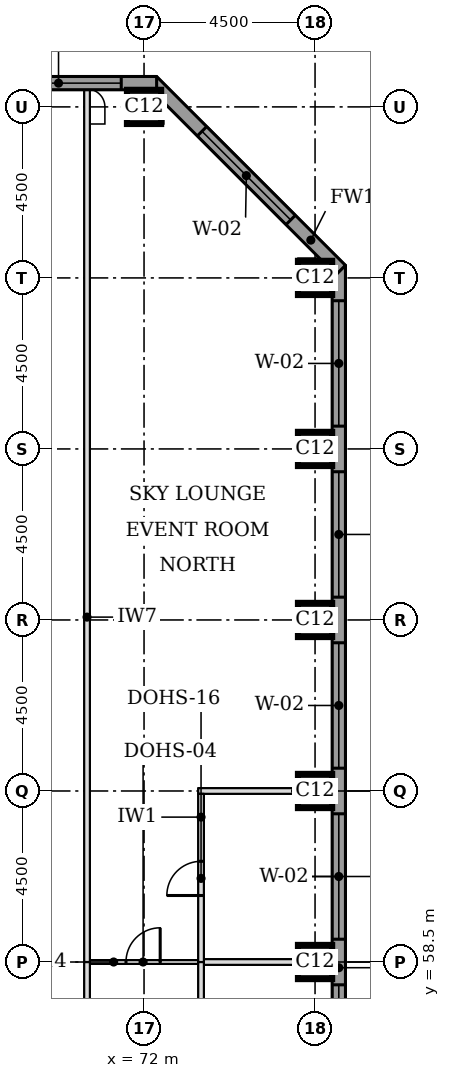
"""IFC4 building model, lengths in metres.
Left out: names, types, materials, properties, quantities, classifications, styles, units other than length and angle.
Written with IfcOpenShell. Run it as: python <this file> out.ifc"""

import sys

from ifc_helpers import new_model, si_unit, direction, frame, frame_2d, origin, origin_2d, place, context, subcontext, project, spatial, rectangle, extrude, element, fill, save


model = new_model("IFC4")
c1 = context("Model", 3, precision=1e-05, world=origin(), true_north=direction((0.0, 1.0)))
c2 = subcontext(c1, "Body", "Model", "MODEL_VIEW")
j1 = project(units=[si_unit("LENGTHUNIT", "METRE"), si_unit("PLANEANGLEUNIT", "RADIAN")], contexts=[c1])
p1 = place(None, origin())
s1 = spatial("IfcSite", under=j1, at=p1, CompositionType="ELEMENT")
p2 = place(p1, origin())
s2 = spatial("IfcBuilding", under=s1, at=p2, CompositionType="ELEMENT")
p3 = place(p2, frame((0.0, 0.0, 260.0)))
s3 = spatial("IfcBuildingStorey", under=s2, at=p3, CompositionType="ELEMENT", Elevation=260.0)
for number, where, z_axis, x_axis in (
    (1, (76.5, 58.5, 0.0), (0.0, 0.0, 1.0), (1.0, 0.0, 0.0)),
    (2, (76.5, 63.0, 0.0), (0.0, 0.0, 1.0), (1.0, 0.0, 0.0)),
    (3, (76.5, 67.5, 0.0), (0.0, 0.0, 1.0), (1.0, 0.0, 0.0)),
    (4, (76.5, 72.0, 0.0), (0.0, 0.0, 1.0), (1.0, 0.0, 0.0)),
    (5, (76.5, 76.5, 0.0), (0.0, 0.0, 1.0), (1.0, 0.0, 0.0)),
    (6, (72.0, 81.0, 0.0), (0.0, 0.0, 1.0), (1.0, 0.0, 0.0)),
):
    element("IfcColumn", number, at=place(p3, frame(where, z_axis=z_axis, x_axis=x_axis)), inside=s3, PredefinedType="COLUMN", context=c2, shape_type="SweptSolid", body=[
        extrude(rectangle(XDim=0.9, YDim=0.9, at=origin_2d()), origin(), (0.0, 0.0, 1.0), 3.7),
    ])
p4 = place(p3, frame((77.125, 44.669, 0.0), z_axis=(0.0, 0.0, 1.0), x_axis=(0.0, 1.0, 0.0)))
e7 = element("IfcWall", 7, at=p4, inside=s3, PredefinedType="STANDARD", context=c2, shape_type="SweptSolid", body=[
    extrude(rectangle(XDim=32.163, YDim=0.35, at=frame_2d((16.081, 0.0))), origin(), (0.0, 0.0, 1.0), 3.425),
])
p5 = place(p4, frame((0.931, 0.0, 0.9)))
e8 = element("IfcOpeningElement", 8, at=p5, cuts=e7, PredefinedType="OPENING", context=c2, shape_type="SweptSolid", body=[
    extrude(rectangle(XDim=3.3, YDim=1.9, at=frame_2d((1.65, 0.95))), frame((0.0, 0.185, 0.0), z_axis=(0.0, -1.0, 0.0), x_axis=(1.0, 0.0, 0.0)), (0.0, 0.0, 1.0), 0.37),
])
p6 = place(p4, frame((5.431, 0.0, 0.9)))
e9 = element("IfcOpeningElement", 9, at=p6, cuts=e7, PredefinedType="OPENING", context=c2, shape_type="SweptSolid", body=[
    extrude(rectangle(XDim=3.3, YDim=1.9, at=frame_2d((1.65, 0.95))), frame((0.0, 0.185, 0.0), z_axis=(0.0, -1.0, 0.0), x_axis=(1.0, 0.0, 0.0)), (0.0, 0.0, 1.0), 0.37),
])
p7 = place(p4, frame((9.931, 0.0, 0.9)))
e10 = element("IfcOpeningElement", 10, at=p7, cuts=e7, PredefinedType="OPENING", context=c2, shape_type="SweptSolid", body=[
    extrude(rectangle(XDim=3.3, YDim=1.9, at=frame_2d((1.65, 0.95))), frame((0.0, 0.185, 0.0), z_axis=(0.0, -1.0, 0.0), x_axis=(1.0, 0.0, 0.0)), (0.0, 0.0, 1.0), 0.37),
])
p8 = place(p4, frame((14.431, 0.0, 0.9)))
e11 = element("IfcOpeningElement", 11, at=p8, cuts=e7, PredefinedType="OPENING", context=c2, shape_type="SweptSolid", body=[
    extrude(rectangle(XDim=3.3, YDim=1.9, at=frame_2d((1.65, 0.95))), frame((0.0, 0.185, 0.0), z_axis=(0.0, -1.0, 0.0), x_axis=(1.0, 0.0, 0.0)), (0.0, 0.0, 1.0), 0.37),
])
p9 = place(p4, frame((18.931, 0.0, 0.9)))
e12 = element("IfcOpeningElement", 12, at=p9, cuts=e7, PredefinedType="OPENING", context=c2, shape_type="SweptSolid", body=[
    extrude(rectangle(XDim=3.3, YDim=1.9, at=frame_2d((1.65, 0.95))), frame((0.0, 0.185, 0.0), z_axis=(0.0, -1.0, 0.0), x_axis=(1.0, 0.0, 0.0)), (0.0, 0.0, 1.0), 0.37),
])
p10 = place(p4, frame((23.431, 0.0, 0.9)))
e13 = element("IfcOpeningElement", 13, at=p10, cuts=e7, PredefinedType="OPENING", context=c2, shape_type="SweptSolid", body=[
    extrude(rectangle(XDim=3.3, YDim=1.9, at=frame_2d((1.65, 0.95))), frame((0.0, 0.185, 0.0), z_axis=(0.0, -1.0, 0.0), x_axis=(1.0, 0.0, 0.0)), (0.0, 0.0, 1.0), 0.37),
])
p11 = place(p4, frame((27.931, 0.0, 0.9)))
e14 = element("IfcOpeningElement", 14, at=p11, cuts=e7, PredefinedType="OPENING", context=c2, shape_type="SweptSolid", body=[
    extrude(rectangle(XDim=3.3, YDim=1.9, at=frame_2d((1.65, 0.95))), frame((0.0, 0.185, 0.0), z_axis=(0.0, -1.0, 0.0), x_axis=(1.0, 0.0, 0.0)), (0.0, 0.0, 1.0), 0.37),
])
p12 = place(p3, frame((77.176, 76.708, 0.0), z_axis=(0.0, 0.0, 1.0), x_axis=(-0.707106781187, 0.707106781187, 0.0)))
e15 = element("IfcWall", 15, at=p12, inside=s3, PredefinedType="STANDARD", context=c2, shape_type="SweptSolid", body=[
    extrude(rectangle(XDim=7.027, YDim=0.35, at=frame_2d((3.513, 0.0))), origin(), (0.0, 0.0, 1.0), 3.425),
])
p13 = place(p12, frame((1.863, 0.0, 0.9)))
e16 = element("IfcOpeningElement", 16, at=p13, cuts=e15, PredefinedType="OPENING", context=c2, shape_type="SweptSolid", body=[
    extrude(rectangle(XDim=3.3, YDim=1.9, at=frame_2d((1.65, 0.95))), frame((0.0, 0.185, 0.0), z_axis=(0.0, -1.0, 0.0), x_axis=(1.0, 0.0, 0.0)), (0.0, 0.0, 1.0), 0.37),
])
p14 = place(p3, frame((72.331, 81.625, 0.0), z_axis=(0.0, 0.0, 1.0), x_axis=(-1.0, 0.0, 0.0)))
e17 = element("IfcWall", 17, at=p14, inside=s3, PredefinedType="STANDARD", context=c2, shape_type="SweptSolid", body=[
    extrude(rectangle(XDim=32.163, YDim=0.35, at=frame_2d((16.081, 0.0))), origin(), (0.0, 0.0, 1.0), 3.425),
])
p15 = place(p14, frame((0.931, 0.0, 0.9)))
e18 = element("IfcOpeningElement", 18, at=p15, cuts=e17, PredefinedType="OPENING", context=c2, shape_type="SweptSolid", body=[
    extrude(rectangle(XDim=3.3, YDim=1.9, at=frame_2d((1.65, 0.95))), frame((0.0, 0.185, 0.0), z_axis=(0.0, -1.0, 0.0), x_axis=(1.0, 0.0, 0.0)), (0.0, 0.0, 1.0), 0.37),
])
p16 = place(p14, frame((5.431, 0.0, 0.9)))
e19 = element("IfcOpeningElement", 19, at=p16, cuts=e17, PredefinedType="OPENING", context=c2, shape_type="SweptSolid", body=[
    extrude(rectangle(XDim=3.3, YDim=1.9, at=frame_2d((1.65, 0.95))), frame((0.0, 0.185, 0.0), z_axis=(0.0, -1.0, 0.0), x_axis=(1.0, 0.0, 0.0)), (0.0, 0.0, 1.0), 0.37),
])
p17 = place(p14, frame((9.931, 0.0, 0.9)))
e20 = element("IfcOpeningElement", 20, at=p17, cuts=e17, PredefinedType="OPENING", context=c2, shape_type="SweptSolid", body=[
    extrude(rectangle(XDim=3.3, YDim=1.9, at=frame_2d((1.65, 0.95))), frame((0.0, 0.185, 0.0), z_axis=(0.0, -1.0, 0.0), x_axis=(1.0, 0.0, 0.0)), (0.0, 0.0, 1.0), 0.37),
])
p18 = place(p14, frame((14.431, 0.0, 0.9)))
e21 = element("IfcOpeningElement", 21, at=p18, cuts=e17, PredefinedType="OPENING", context=c2, shape_type="SweptSolid", body=[
    extrude(rectangle(XDim=3.3, YDim=1.9, at=frame_2d((1.65, 0.95))), frame((0.0, 0.185, 0.0), z_axis=(0.0, -1.0, 0.0), x_axis=(1.0, 0.0, 0.0)), (0.0, 0.0, 1.0), 0.37),
])
p19 = place(p14, frame((18.931, 0.0, 0.9)))
e22 = element("IfcOpeningElement", 22, at=p19, cuts=e17, PredefinedType="OPENING", context=c2, shape_type="SweptSolid", body=[
    extrude(rectangle(XDim=3.3, YDim=1.9, at=frame_2d((1.65, 0.95))), frame((0.0, 0.185, 0.0), z_axis=(0.0, -1.0, 0.0), x_axis=(1.0, 0.0, 0.0)), (0.0, 0.0, 1.0), 0.37),
])
p20 = place(p14, frame((23.431, 0.0, 0.9)))
e23 = element("IfcOpeningElement", 23, at=p20, cuts=e17, PredefinedType="OPENING", context=c2, shape_type="SweptSolid", body=[
    extrude(rectangle(XDim=3.3, YDim=1.9, at=frame_2d((1.65, 0.95))), frame((0.0, 0.185, 0.0), z_axis=(0.0, -1.0, 0.0), x_axis=(1.0, 0.0, 0.0)), (0.0, 0.0, 1.0), 0.37),
])
p21 = place(p14, frame((27.931, 0.0, 0.9)))
e24 = element("IfcOpeningElement", 24, at=p21, cuts=e17, PredefinedType="OPENING", context=c2, shape_type="SweptSolid", body=[
    extrude(rectangle(XDim=3.3, YDim=1.9, at=frame_2d((1.65, 0.95))), frame((0.0, 0.185, 0.0), z_axis=(0.0, -1.0, 0.0), x_axis=(1.0, 0.0, 0.0)), (0.0, 0.0, 1.0), 0.37),
])
p22 = place(p3, frame((70.575, 58.5, 0.0), z_axis=(0.0, 0.0, 1.0), x_axis=(1.0, 0.0, 0.0)))
e25 = element("IfcWall", 25, at=p22, inside=s3, PredefinedType="PARTITIONING", context=c2, shape_type="SweptSolid", body=[
    extrude(rectangle(XDim=2.85, YDim=0.1, at=frame_2d((1.425, 0.0))), origin(), (0.0, 0.0, 1.0), 3.45),
])
p23 = place(p22, frame((0.95, 0.0, 0.0)))
e26 = element("IfcOpeningElement", 26, at=p23, cuts=e25, PredefinedType="OPENING", context=c2, shape_type="SweptSolid", body=[
    extrude(rectangle(XDim=0.9, YDim=2.1, at=frame_2d((0.45, 1.05))), frame((0.0, 0.06, 0.0), z_axis=(0.0, -1.0, 0.0), x_axis=(1.0, 0.0, 0.0)), (0.0, 0.0, 1.0), 0.12),
])
p24 = place(p3, frame((73.575, 58.5, 0.0), z_axis=(0.0, 0.0, 1.0), x_axis=(1.0, 0.0, 0.0)))
e27 = element("IfcWall", 27, at=p24, inside=s3, PredefinedType="PARTITIONING", context=c2, shape_type="SweptSolid", body=[
    extrude(rectangle(XDim=3.375, YDim=0.15, at=frame_2d((1.688, 0.0))), origin(), (0.0, 0.0, 1.0), 3.45),
])
p25 = place(p3, frame((73.425, 63.0, 0.0), z_axis=(0.0, 0.0, 1.0), x_axis=(1.0, 0.0, 0.0)))
e28 = element("IfcWall", 28, at=p25, inside=s3, PredefinedType="PARTITIONING", context=c2, shape_type="SweptSolid", body=[
    extrude(rectangle(XDim=3.525, YDim=0.15, at=frame_2d((1.762, 0.0))), origin(), (0.0, 0.0, 1.0), 3.45),
])
p26 = place(p3, frame((70.5, 54.0, 0.0), z_axis=(0.0, 0.0, 1.0), x_axis=(0.0, 1.0, 0.0)))
e29 = element("IfcWall", 29, at=p26, inside=s3, PredefinedType="PARTITIONING", context=c2, shape_type="SweptSolid", body=[
    extrude(rectangle(XDim=4.5, YDim=0.15, at=frame_2d((2.25, 0.0))), origin(), (0.0, 0.0, 1.0), 3.45),
])
p27 = place(p26, frame((1.75, 0.0, 0.0)))
e30 = element("IfcOpeningElement", 30, at=p27, cuts=e29, PredefinedType="OPENING", context=c2, shape_type="SweptSolid", body=[
    extrude(rectangle(XDim=1.0, YDim=2.1, at=frame_2d((0.5, 1.05))), frame((0.0, 0.085, 0.0), z_axis=(0.0, -1.0, 0.0), x_axis=(1.0, 0.0, 0.0)), (0.0, 0.0, 1.0), 0.17),
])
p28 = place(p3, frame((73.5, 54.1, 0.0), z_axis=(0.0, 0.0, 1.0), x_axis=(0.0, 1.0, 0.0)))
e31 = element("IfcWall", 31, at=p28, inside=s3, PredefinedType="PARTITIONING", context=c2, shape_type="SweptSolid", body=[
    extrude(rectangle(XDim=4.4, YDim=0.15, at=frame_2d((2.2, 0.0))), origin(), (0.0, 0.0, 1.0), 3.45),
])
p29 = place(p28, frame((1.75, 0.0, 0.0)))
e32 = element("IfcOpeningElement", 32, at=p29, cuts=e31, PredefinedType="OPENING", context=c2, shape_type="SweptSolid", body=[
    extrude(rectangle(XDim=0.9, YDim=2.1, at=frame_2d((0.45, 1.05))), frame((0.0, 0.085, 0.0), z_axis=(0.0, -1.0, 0.0), x_axis=(1.0, 0.0, 0.0)), (0.0, 0.0, 1.0), 0.17),
])
p30 = place(p3, frame((70.5, 58.5, 0.0), z_axis=(0.0, 0.0, 1.0), x_axis=(0.0, 1.0, 0.0)))
e33 = element("IfcWall", 33, at=p30, inside=s3, PredefinedType="PARTITIONING", context=c2, shape_type="SweptSolid", body=[
    extrude(rectangle(XDim=22.95, YDim=0.15, at=frame_2d((11.475, 0.0))), origin(), (0.0, 0.0, 1.0), 3.45),
])
p31 = place(p3, frame((73.5, 58.5, 0.0), z_axis=(0.0, 0.0, 1.0), x_axis=(0.0, 1.0, 0.0)))
e34 = element("IfcWall", 34, at=p31, inside=s3, PredefinedType="PARTITIONING", context=c2, shape_type="SweptSolid", body=[
    extrude(rectangle(XDim=4.425, YDim=0.15, at=frame_2d((2.212, 0.0))), origin(), (0.0, 0.0, 1.0), 3.45),
])
p32 = place(p31, frame((1.75, 0.0, 0.0)))
e35 = element("IfcOpeningElement", 35, at=p32, cuts=e34, PredefinedType="OPENING", context=c2, shape_type="SweptSolid", body=[
    extrude(rectangle(XDim=0.9, YDim=2.1, at=frame_2d((0.45, 1.05))), frame((0.0, 0.085, 0.0), z_axis=(0.0, -1.0, 0.0), x_axis=(1.0, 0.0, 0.0)), (0.0, 0.0, 1.0), 0.17),
])
p33 = place(p7, origin())
e36 = element("IfcWindow", 36, at=p33, inside=s3, PartitioningType="SINGLE_PANEL", PredefinedType="WINDOW", context=c2, shape_type="SweptSolid", body=[
    extrude(rectangle(XDim=3.3, YDim=1.9, at=frame_2d((1.65, 0.95))), frame((0.0, 0.085, 0.0), z_axis=(0.0, -1.0, 0.0), x_axis=(1.0, 0.0, 0.0)), (0.0, 0.0, 1.0), 0.06),
])
fill(e10, e36)
p34 = place(p8, origin())
e37 = element("IfcWindow", 37, at=p34, inside=s3, PartitioningType="SINGLE_PANEL", PredefinedType="WINDOW", context=c2, shape_type="SweptSolid", body=[
    extrude(rectangle(XDim=3.3, YDim=1.9, at=frame_2d((1.65, 0.95))), frame((0.0, 0.085, 0.0), z_axis=(0.0, -1.0, 0.0), x_axis=(1.0, 0.0, 0.0)), (0.0, 0.0, 1.0), 0.06),
])
fill(e11, e37)
p35 = place(p9, origin())
e38 = element("IfcWindow", 38, at=p35, inside=s3, PartitioningType="SINGLE_PANEL", PredefinedType="WINDOW", context=c2, shape_type="SweptSolid", body=[
    extrude(rectangle(XDim=3.3, YDim=1.9, at=frame_2d((1.65, 0.95))), frame((0.0, 0.085, 0.0), z_axis=(0.0, -1.0, 0.0), x_axis=(1.0, 0.0, 0.0)), (0.0, 0.0, 1.0), 0.06),
])
fill(e12, e38)
p36 = place(p10, origin())
e39 = element("IfcWindow", 39, at=p36, inside=s3, PartitioningType="SINGLE_PANEL", PredefinedType="WINDOW", context=c2, shape_type="SweptSolid", body=[
    extrude(rectangle(XDim=3.3, YDim=1.9, at=frame_2d((1.65, 0.95))), frame((0.0, 0.085, 0.0), z_axis=(0.0, -1.0, 0.0), x_axis=(1.0, 0.0, 0.0)), (0.0, 0.0, 1.0), 0.06),
])
fill(e13, e39)
p37 = place(p11, origin())
e40 = element("IfcWindow", 40, at=p37, inside=s3, PartitioningType="SINGLE_PANEL", PredefinedType="WINDOW", context=c2, shape_type="SweptSolid", body=[
    extrude(rectangle(XDim=3.3, YDim=1.9, at=frame_2d((1.65, 0.95))), frame((0.0, 0.085, 0.0), z_axis=(0.0, -1.0, 0.0), x_axis=(1.0, 0.0, 0.0)), (0.0, 0.0, 1.0), 0.06),
])
fill(e14, e40)
p38 = place(p13, origin())
e41 = element("IfcWindow", 41, at=p38, inside=s3, PartitioningType="SINGLE_PANEL", PredefinedType="WINDOW", context=c2, shape_type="SweptSolid", body=[
    extrude(rectangle(XDim=3.3, YDim=1.9, at=frame_2d((1.65, 0.95))), frame((0.0, 0.085, 0.0), z_axis=(0.0, -1.0, 0.0), x_axis=(1.0, 0.0, 0.0)), (0.0, 0.0, 1.0), 0.06),
])
fill(e16, e41)
p39 = place(p15, origin())
e42 = element("IfcWindow", 42, at=p39, inside=s3, PartitioningType="SINGLE_PANEL", PredefinedType="WINDOW", context=c2, shape_type="SweptSolid", body=[
    extrude(rectangle(XDim=3.3, YDim=1.9, at=frame_2d((1.65, 0.95))), frame((0.0, 0.085, 0.0), z_axis=(0.0, -1.0, 0.0), x_axis=(1.0, 0.0, 0.0)), (0.0, 0.0, 1.0), 0.06),
])
fill(e18, e42)
p40 = place(p23, origin())
e43 = element("IfcDoor", 43, at=p40, inside=s3, OperationType="SINGLE_SWING_RIGHT", PredefinedType="DOOR", context=c2, shape_type="SweptSolid", body=[
    extrude(rectangle(XDim=0.9, YDim=2.1, at=frame_2d((0.45, 1.05))), frame((0.0, 0.025, 0.0), z_axis=(0.0, -1.0, 0.0), x_axis=(1.0, 0.0, 0.0)), (0.0, 0.0, 1.0), 0.05),
])
fill(e26, e43)
p41 = place(p32, origin())
e44 = element("IfcDoor", 44, at=p41, inside=s3, OperationType="SINGLE_SWING_LEFT", PredefinedType="DOOR", context=c2, shape_type="SweptSolid", body=[
    extrude(rectangle(XDim=0.9, YDim=2.1, at=frame_2d((0.45, 1.05))), frame((0.0, 0.025, 0.0), z_axis=(0.0, -1.0, 0.0), x_axis=(1.0, 0.0, 0.0)), (0.0, 0.0, 1.0), 0.05),
])
fill(e35, e44)
save(model, sys.argv[1])
